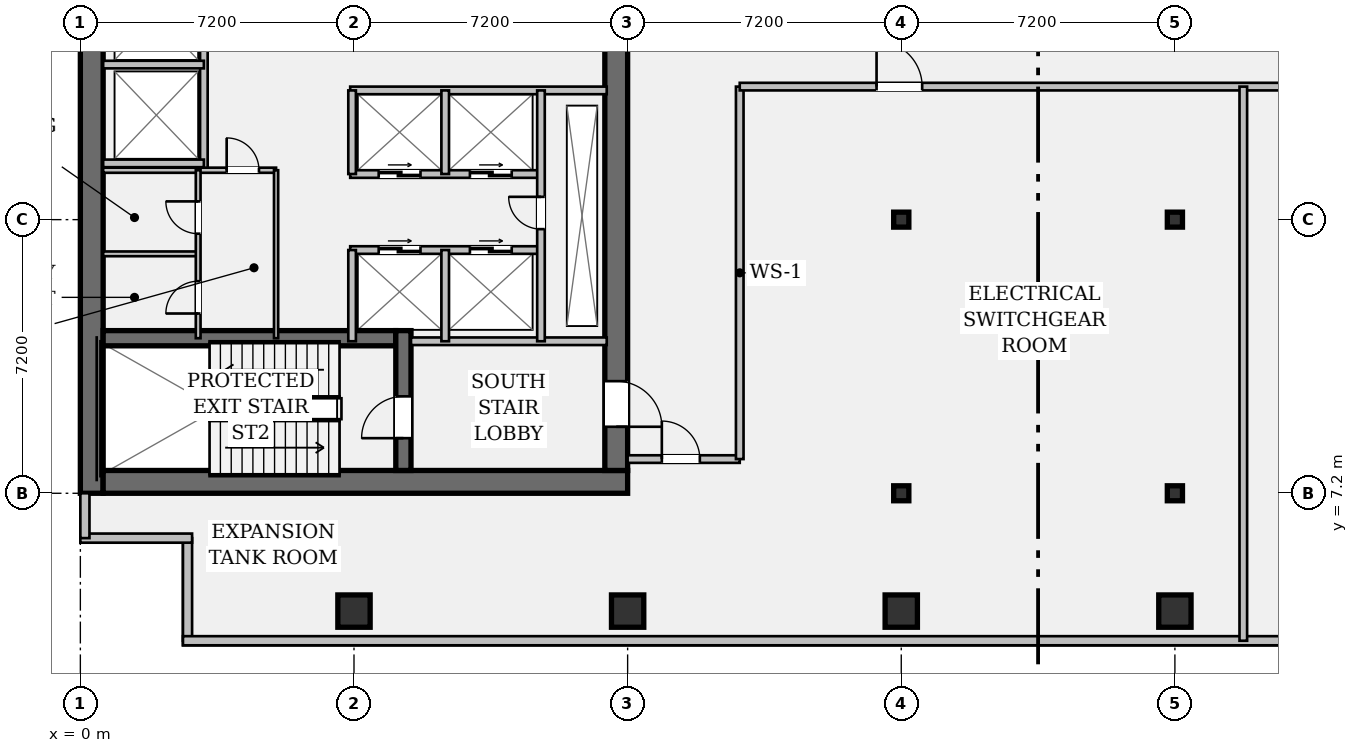
"""IFC4 building model, lengths in metres.
Left out: names, types, materials, properties, quantities, classifications, styles, units other than length and angle.
Written with IfcOpenShell. Run it as: python <this file> out.ifc"""

import sys

from ifc_helpers import new_model, si_unit, direction, frame, frame_2d, origin, origin_2d, place, context, subcontext, project, spatial, rectangle, hollow_rectangle, i_section, extrude, element, fill, save


model = new_model("IFC4")
c1 = context("Model", 3, precision=1e-05, world=origin(), true_north=direction((0.0, 1.0)))
c2 = subcontext(c1, "Body", "Model", "MODEL_VIEW")
j1 = project(units=[si_unit("LENGTHUNIT", "METRE"), si_unit("PLANEANGLEUNIT", "RADIAN")], contexts=[c1])
p1 = place(None, origin())
s1 = spatial("IfcSite", under=j1, at=p1, CompositionType="ELEMENT")
p2 = place(p1, origin())
s2 = spatial("IfcBuilding", under=s1, at=p2, CompositionType="ELEMENT")
p3 = place(p2, frame((0.0, 0.0, 163.8)))
s3 = spatial("IfcBuildingStorey", under=s2, at=p3, CompositionType="ELEMENT", Elevation=163.8)
p4 = place(p3, frame((0.3, 7.2, 0.0), z_axis=(0.0, 0.0, 1.0), x_axis=(0.0, 1.0, 0.0)))
e1 = element("IfcWall", 1, at=p4, inside=s3, PredefinedType="SHEAR", context=c2, shape_type="SweptSolid", body=[
    extrude(rectangle(XDim=28.8, YDim=0.6, at=frame_2d((14.4, 0.0))), origin(), (0.0, 0.0, 1.0), 4.6),
])
p5 = place(p3, frame((0.6, 7.5, 0.0), z_axis=(0.0, 0.0, 1.0), x_axis=(1.0, 0.0, 0.0)))
e2 = element("IfcWall", 2, at=p5, inside=s3, PredefinedType="SHEAR", context=c2, shape_type="SweptSolid", body=[
    extrude(rectangle(XDim=13.8, YDim=0.6, at=frame_2d((6.9, 0.0))), origin(), (0.0, 0.0, 1.0), 4.6),
])
p6 = place(p3, frame((14.1, 35.4, 0.0), z_axis=(0.0, 0.0, 1.0), x_axis=(0.0, -1.0, 0.0)))
e3 = element("IfcWall", 3, at=p6, inside=s3, PredefinedType="SHEAR", context=c2, shape_type="SweptSolid", body=[
    extrude(rectangle(XDim=27.6, YDim=0.6, at=frame_2d((13.8, 0.0))), origin(), (0.0, 0.0, 1.0), 4.6),
])
p7 = place(p6, frame((1.3, 0.0, 0.0)))
e4 = element("IfcOpeningElement", 4, at=p7, cuts=e3, PredefinedType="OPENING", context=c2, shape_type="SweptSolid", body=[
    extrude(rectangle(XDim=1.2, YDim=2.15, at=frame_2d((0.6, 1.075))), frame((0.0, 0.312, 0.0), z_axis=(0.0, -1.0, 0.0), x_axis=(1.0, 0.0, 0.0)), (0.0, 0.0, 1.0), 0.624),
])
p8 = place(p6, frame((25.25, 0.0, 0.0)))
e5 = element("IfcOpeningElement", 5, at=p8, cuts=e3, PredefinedType="OPENING", context=c2, shape_type="SweptSolid", body=[
    extrude(rectangle(XDim=1.2, YDim=2.15, at=frame_2d((0.6, 1.075))), frame((0.0, 0.312, 0.0), z_axis=(0.0, -1.0, 0.0), x_axis=(1.0, 0.0, 0.0)), (0.0, 0.0, 1.0), 0.624),
])
p9 = place(p6, frame((14.6, 0.0, 0.0)))
e6 = element("IfcOpeningElement", 6, at=p9, cuts=e3, PredefinedType="OPENING", context=c2, shape_type="SweptSolid", body=[
    extrude(rectangle(XDim=1.6, YDim=2.2, at=frame_2d((0.8, 1.1))), frame((0.0, 0.312, 0.0), z_axis=(0.0, -1.0, 0.0), x_axis=(1.0, 0.0, 0.0)), (0.0, 0.0, 1.0), 0.624),
])
p10 = place(p3, frame((0.6, 11.28, 0.0), z_axis=(0.0, 0.0, 1.0), x_axis=(1.0, 0.0, 0.0)))
e7 = element("IfcWall", 7, at=p10, inside=s3, PredefinedType="SHEAR", context=c2, shape_type="SweptSolid", body=[
    extrude(rectangle(XDim=7.7, YDim=0.4, at=frame_2d((3.85, 0.0))), origin(), (0.0, 0.0, 1.0), 4.6),
])
p11 = place(p3, frame((8.5, 7.8, 0.0), z_axis=(0.0, 0.0, 1.0), x_axis=(0.0, 1.0, 0.0)))
e8 = element("IfcWall", 8, at=p11, inside=s3, PredefinedType="SHEAR", context=c2, shape_type="SweptSolid", body=[
    extrude(rectangle(XDim=3.68, YDim=0.4, at=frame_2d((1.84, 0.0))), origin(), (0.0, 0.0, 1.0), 4.6),
])
p12 = place(p11, frame((0.85, 0.0, 0.0)))
e9 = element("IfcOpeningElement", 9, at=p12, cuts=e8, PredefinedType="OPENING", context=c2, shape_type="SweptSolid", body=[
    extrude(rectangle(XDim=1.1, YDim=2.15, at=frame_2d((0.55, 1.075))), frame((0.0, 0.212, 0.0), z_axis=(0.0, -1.0, 0.0), x_axis=(1.0, 0.0, 0.0)), (0.0, 0.0, 1.0), 0.424),
])
for number, where, z_axis, x_axis in (
    (10, (7.2, 4.1, 0.0), (0.0, 0.0, 1.0), (1.0, 0.0, 0.0)),
    (11, (14.4, 4.1, 0.0), (0.0, 0.0, 1.0), (1.0, 0.0, 0.0)),
    (12, (21.6, 4.1, 0.0), (0.0, 0.0, 1.0), (1.0, 0.0, 0.0)),
):
    element("IfcColumn", number, at=place(p3, frame(where, z_axis=z_axis, x_axis=x_axis)), inside=s3, PredefinedType="COLUMN", context=c2, shape_type="SweptSolid", body=[
        extrude(hollow_rectangle(XDim=0.85, YDim=0.85, WallThickness=0.05, at=origin_2d()), origin(), (0.0, 0.0, 1.0), 4.6),
    ])
for number, where, z_axis, x_axis in (
    (13, (21.6, 7.2, 0.0), (0.0, 0.0, 1.0), (1.0, 0.0, 0.0)),
    (14, (21.6, 14.4, 0.0), (0.0, 0.0, 1.0), (1.0, 0.0, 0.0)),
):
    element("IfcColumn", number, at=place(p3, frame(where, z_axis=z_axis, x_axis=x_axis)), inside=s3, PredefinedType="COLUMN", context=c2, shape_type="SweptSolid", body=[
        extrude(i_section(OverallWidth=0.399, OverallDepth=0.394, WebThickness=0.023, FlangeThickness=0.037, FilletRadius=0.018, at=origin_2d()), origin(), (0.0, 0.0, 1.0), 4.6),
    ])
p13 = place(p3, frame((28.8, 4.1, 0.0), z_axis=(0.0, 0.0, 1.0), x_axis=(1.0, 0.0, 0.0)))
e15 = element("IfcColumn", 15, at=p13, inside=s3, PredefinedType="COLUMN", context=c2, shape_type="SweptSolid", body=[
    extrude(hollow_rectangle(XDim=0.85, YDim=0.85, WallThickness=0.05, at=origin_2d()), origin(), (0.0, 0.0, 1.0), 4.6),
])
for number, where, z_axis, x_axis in (
    (16, (28.8, 7.2, 0.0), (0.0, 0.0, 1.0), (1.0, 0.0, 0.0)),
    (17, (28.8, 14.4, 0.0), (0.0, 0.0, 1.0), (1.0, 0.0, 0.0)),
):
    element("IfcColumn", number, at=place(p3, frame(where, z_axis=z_axis, x_axis=x_axis)), inside=s3, PredefinedType="COLUMN", context=c2, shape_type="SweptSolid", body=[
        extrude(i_section(OverallWidth=0.399, OverallDepth=0.394, WebThickness=0.023, FlangeThickness=0.037, FilletRadius=0.018, at=origin_2d()), origin(), (0.0, 0.0, 1.0), 4.6),
    ])
p14 = place(p3, frame((2.82, 3.32, 0.0), z_axis=(0.0, 0.0, 1.0), x_axis=(0.0, 1.0, 0.0)))
e18 = element("IfcWall", 18, at=p14, inside=s3, PredefinedType="STANDARD", context=c2, shape_type="SweptSolid", body=[
    extrude(rectangle(XDim=2.7, YDim=0.24, at=frame_2d((1.35, 0.0))), origin(), (0.0, 0.0, 1.0), 4.6),
])
p15 = place(p3, frame((2.94, 6.02, 0.0), z_axis=(0.0, 0.0, 1.0), x_axis=(-1.0, 0.0, 0.0)))
e19 = element("IfcWall", 19, at=p15, inside=s3, PredefinedType="STANDARD", context=c2, shape_type="SweptSolid", body=[
    extrude(rectangle(XDim=2.94, YDim=0.24, at=frame_2d((1.47, 0.0))), origin(), (0.0, 0.0, 1.0), 4.6),
])
p16 = place(p3, frame((0.12, 6.02, 0.0), z_axis=(0.0, 0.0, 1.0), x_axis=(0.0, 1.0, 0.0)))
e20 = element("IfcWall", 20, at=p16, inside=s3, PredefinedType="STANDARD", context=c2, shape_type="SweptSolid", body=[
    extrude(rectangle(XDim=1.18, YDim=0.24, at=frame_2d((0.59, 0.0))), origin(), (0.0, 0.0, 1.0), 4.6),
])
p17 = place(p3, frame((41.3, 3.32, 0.0), z_axis=(0.0, 0.0, 1.0), x_axis=(-1.0, 0.0, 0.0)))
e21 = element("IfcWall", 21, at=p17, inside=s3, PredefinedType="STANDARD", context=c2, shape_type="SweptSolid", body=[
    extrude(rectangle(XDim=38.6, YDim=0.24, at=frame_2d((19.3, 0.0))), origin(), (0.0, 0.0, 1.0), 4.6),
])
p18 = place(p3, frame((8.7, 11.2, 0.0), z_axis=(0.0, 0.0, 1.0), x_axis=(1.0, 0.0, 0.0)))
e22 = element("IfcWall", 22, at=p18, inside=s3, PredefinedType="PARTITIONING", context=c2, shape_type="SweptSolid", body=[
    extrude(rectangle(XDim=5.15, YDim=0.2, at=frame_2d((2.575, 0.0))), origin(), (0.0, 0.0, 1.0), 4.6),
])
p19 = place(p3, frame((3.25, 15.7, 0.0), z_axis=(0.0, 0.0, 1.0), x_axis=(0.0, 1.0, 0.0)))
e23 = element("IfcWall", 23, at=p19, inside=s3, PredefinedType="PARTITIONING", context=c2, shape_type="SweptSolid", body=[
    extrude(rectangle(XDim=13.08, YDim=0.2, at=frame_2d((6.54, 0.0))), origin(), (0.0, 0.0, 1.0), 4.6),
])
for number, where, z_axis, x_axis in (
    (24, (0.6, 15.88, 0.0), (0.0, 0.0, 1.0), (1.0, 0.0, 0.0)),
    (25, (0.6, 18.48, 0.0), (0.0, 0.0, 1.0), (1.0, 0.0, 0.0)),
):
    element("IfcWall", number, at=place(p3, frame(where, z_axis=z_axis, x_axis=x_axis)), inside=s3, PredefinedType="PARTITIONING", context=c2, shape_type="SweptSolid", body=[
        extrude(rectangle(XDim=2.65, YDim=0.2, at=frame_2d((1.325, 0.0))), origin(), (0.0, 0.0, 1.0), 4.6),
    ])
p20 = place(p3, frame((7.1, 17.8, 0.0), z_axis=(0.0, 0.0, 1.0), x_axis=(1.0, 0.0, 0.0)))
e26 = element("IfcWall", 26, at=p20, inside=s3, PredefinedType="PARTITIONING", context=c2, shape_type="SweptSolid", body=[
    extrude(rectangle(XDim=6.75, YDim=0.2, at=frame_2d((3.375, 0.0))), origin(), (0.0, 0.0, 1.0), 4.6),
])
p21 = place(p3, frame((7.1, 15.6, 0.0), z_axis=(0.0, 0.0, 1.0), x_axis=(1.0, 0.0, 0.0)))
e27 = element("IfcWall", 27, at=p21, inside=s3, PredefinedType="PARTITIONING", context=c2, shape_type="SweptSolid", body=[
    extrude(rectangle(XDim=5.02, YDim=0.2, at=frame_2d((2.51, 0.0))), origin(), (0.0, 0.0, 1.0), 4.6),
])
p22 = place(p21, frame((0.75, 0.0, 0.0)))
e28 = element("IfcOpeningElement", 28, at=p22, cuts=e27, PredefinedType="OPENING", context=c2, shape_type="SweptSolid", body=[
    extrude(rectangle(XDim=1.1, YDim=2.2, at=frame_2d((0.55, 1.1))), frame((0.0, 0.112, 0.0), z_axis=(0.0, -1.0, 0.0), x_axis=(1.0, 0.0, 0.0)), (0.0, 0.0, 1.0), 0.224),
])
p23 = place(p21, frame((3.15, 0.0, 0.0)))
e29 = element("IfcOpeningElement", 29, at=p23, cuts=e27, PredefinedType="OPENING", context=c2, shape_type="SweptSolid", body=[
    extrude(rectangle(XDim=1.1, YDim=2.2, at=frame_2d((0.55, 1.1))), frame((0.0, 0.112, 0.0), z_axis=(0.0, -1.0, 0.0), x_axis=(1.0, 0.0, 0.0)), (0.0, 0.0, 1.0), 0.224),
])
p24 = place(p3, frame((7.1, 13.6, 0.0), z_axis=(0.0, 0.0, 1.0), x_axis=(1.0, 0.0, 0.0)))
e30 = element("IfcWall", 30, at=p24, inside=s3, PredefinedType="PARTITIONING", context=c2, shape_type="SweptSolid", body=[
    extrude(rectangle(XDim=5.02, YDim=0.2, at=frame_2d((2.51, 0.0))), origin(), (0.0, 0.0, 1.0), 4.6),
])
p25 = place(p24, frame((0.75, 0.0, 0.0)))
e31 = element("IfcOpeningElement", 31, at=p25, cuts=e30, PredefinedType="OPENING", context=c2, shape_type="SweptSolid", body=[
    extrude(rectangle(XDim=1.1, YDim=2.2, at=frame_2d((0.55, 1.1))), frame((0.0, 0.112, 0.0), z_axis=(0.0, -1.0, 0.0), x_axis=(1.0, 0.0, 0.0)), (0.0, 0.0, 1.0), 0.224),
])
p26 = place(p24, frame((3.15, 0.0, 0.0)))
e32 = element("IfcOpeningElement", 32, at=p26, cuts=e30, PredefinedType="OPENING", context=c2, shape_type="SweptSolid", body=[
    extrude(rectangle(XDim=1.1, YDim=2.2, at=frame_2d((0.55, 1.1))), frame((0.0, 0.112, 0.0), z_axis=(0.0, -1.0, 0.0), x_axis=(1.0, 0.0, 0.0)), (0.0, 0.0, 1.0), 0.224),
])
p27 = place(p3, frame((7.15, 15.6, 0.0), z_axis=(0.0, 0.0, 1.0), x_axis=(0.0, 1.0, 0.0)))
e33 = element("IfcWall", 33, at=p27, inside=s3, PredefinedType="PARTITIONING", context=c2, shape_type="SweptSolid", body=[
    extrude(rectangle(XDim=2.2, YDim=0.2, at=frame_2d((1.1, 0.0))), origin(), (0.0, 0.0, 1.0), 4.6),
])
p28 = place(p3, frame((7.15, 11.2, 0.0), z_axis=(0.0, 0.0, 1.0), x_axis=(0.0, 1.0, 0.0)))
e34 = element("IfcWall", 34, at=p28, inside=s3, PredefinedType="PARTITIONING", context=c2, shape_type="SweptSolid", body=[
    extrude(rectangle(XDim=2.4, YDim=0.2, at=frame_2d((1.2, 0.0))), origin(), (0.0, 0.0, 1.0), 4.6),
])
p29 = place(p3, frame((9.6, 15.6, 0.0), z_axis=(0.0, 0.0, 1.0), x_axis=(0.0, 1.0, 0.0)))
e35 = element("IfcWall", 35, at=p29, inside=s3, PredefinedType="PARTITIONING", context=c2, shape_type="SweptSolid", body=[
    extrude(rectangle(XDim=2.2, YDim=0.2, at=frame_2d((1.1, 0.0))), origin(), (0.0, 0.0, 1.0), 4.6),
])
p30 = place(p3, frame((9.6, 11.2, 0.0), z_axis=(0.0, 0.0, 1.0), x_axis=(0.0, 1.0, 0.0)))
e36 = element("IfcWall", 36, at=p30, inside=s3, PredefinedType="PARTITIONING", context=c2, shape_type="SweptSolid", body=[
    extrude(rectangle(XDim=2.4, YDim=0.2, at=frame_2d((1.2, 0.0))), origin(), (0.0, 0.0, 1.0), 4.6),
])
p31 = place(p3, frame((12.12, 11.2, 0.0), z_axis=(0.0, 0.0, 1.0), x_axis=(0.0, 1.0, 0.0)))
e37 = element("IfcWall", 37, at=p31, inside=s3, PredefinedType="PARTITIONING", context=c2, shape_type="SweptSolid", body=[
    extrude(rectangle(XDim=6.6, YDim=0.2, at=frame_2d((3.3, 0.0))), origin(), (0.0, 0.0, 1.0), 4.6),
])
p32 = place(p31, frame((2.95, 0.0, 0.0)))
e38 = element("IfcOpeningElement", 38, at=p32, cuts=e37, PredefinedType="OPENING", context=c2, shape_type="SweptSolid", body=[
    extrude(rectangle(XDim=0.85, YDim=2.15, at=frame_2d((0.425, 1.075))), frame((0.0, 0.112, 0.0), z_axis=(0.0, -1.0, 0.0), x_axis=(1.0, 0.0, 0.0)), (0.0, 0.0, 1.0), 0.224),
])
p33 = place(p3, frame((0.6, 15.7, 0.0), z_axis=(0.0, 0.0, 1.0), x_axis=(1.0, 0.0, 0.0)))
e39 = element("IfcWall", 39, at=p33, inside=s3, PredefinedType="PARTITIONING", context=c2, shape_type="SweptSolid", body=[
    extrude(rectangle(XDim=4.55, YDim=0.135, at=frame_2d((2.275, 0.0))), origin(), (0.0, 0.0, 1.0), 4.6),
])
p34 = place(p33, frame((3.25, 0.0, 0.0)))
e40 = element("IfcOpeningElement", 40, at=p34, cuts=e39, PredefinedType="OPENING", context=c2, shape_type="SweptSolid", body=[
    extrude(rectangle(XDim=0.85, YDim=2.15, at=frame_2d((0.425, 1.075))), frame((0.0, 0.08, 0.0), z_axis=(0.0, -1.0, 0.0), x_axis=(1.0, 0.0, 0.0)), (0.0, 0.0, 1.0), 0.159),
])
p35 = place(p3, frame((5.15, 11.28, 0.0), z_axis=(0.0, 0.0, 1.0), x_axis=(0.0, 1.0, 0.0)))
e41 = element("IfcWall", 41, at=p35, inside=s3, PredefinedType="PARTITIONING", context=c2, shape_type="SweptSolid", body=[
    extrude(rectangle(XDim=4.42, YDim=0.11, at=frame_2d((2.21, 0.0))), origin(), (0.0, 0.0, 1.0), 4.6),
])
p36 = place(p3, frame((0.6, 13.5, 0.0), z_axis=(0.0, 0.0, 1.0), x_axis=(1.0, 0.0, 0.0)))
e42 = element("IfcWall", 42, at=p36, inside=s3, PredefinedType="PARTITIONING", context=c2, shape_type="SweptSolid", body=[
    extrude(rectangle(XDim=2.5, YDim=0.125, at=frame_2d((1.25, 0.0))), origin(), (0.0, 0.0, 1.0), 4.6),
])
p37 = place(p3, frame((3.1, 11.28, 0.0), z_axis=(0.0, 0.0, 1.0), x_axis=(0.0, 1.0, 0.0)))
e43 = element("IfcWall", 43, at=p37, inside=s3, PredefinedType="PARTITIONING", context=c2, shape_type="SweptSolid", body=[
    extrude(rectangle(XDim=4.42, YDim=0.125, at=frame_2d((2.21, 0.0))), origin(), (0.0, 0.0, 1.0), 4.6),
])
p38 = place(p37, frame((0.65, 0.0, 0.0)))
e44 = element("IfcOpeningElement", 44, at=p38, cuts=e43, PredefinedType="OPENING", context=c2, shape_type="SweptSolid", body=[
    extrude(rectangle(XDim=0.85, YDim=2.15, at=frame_2d((0.425, 1.075))), frame((0.0, 0.074, 0.0), z_axis=(0.0, -1.0, 0.0), x_axis=(1.0, 0.0, 0.0)), (0.0, 0.0, 1.0), 0.149),
])
p39 = place(p37, frame((2.75, 0.0, 0.0)))
e45 = element("IfcOpeningElement", 45, at=p39, cuts=e43, PredefinedType="OPENING", context=c2, shape_type="SweptSolid", body=[
    extrude(rectangle(XDim=0.85, YDim=2.15, at=frame_2d((0.425, 1.075))), frame((0.0, 0.074, 0.0), z_axis=(0.0, -1.0, 0.0), x_axis=(1.0, 0.0, 0.0)), (0.0, 0.0, 1.0), 0.149),
])
p40 = place(p3, frame((14.4, 8.1, 0.0), z_axis=(0.0, 0.0, 1.0), x_axis=(1.0, 0.0, 0.0)))
e46 = element("IfcWall", 46, at=p40, inside=s3, PredefinedType="PARTITIONING", context=c2, shape_type="SweptSolid", body=[
    extrude(rectangle(XDim=2.95, YDim=0.2, at=frame_2d((1.475, 0.0))), origin(), (0.0, 0.0, 1.0), 4.168),
])
p41 = place(p40, frame((0.9, 0.0, 0.0)))
e47 = element("IfcOpeningElement", 47, at=p41, cuts=e46, PredefinedType="OPENING", context=c2, shape_type="SweptSolid", body=[
    extrude(rectangle(XDim=1.0, YDim=2.15, at=frame_2d((0.5, 1.075))), frame((0.0, 0.112, 0.0), z_axis=(0.0, -1.0, 0.0), x_axis=(1.0, 0.0, 0.0)), (0.0, 0.0, 1.0), 0.224),
])
p42 = place(p3, frame((17.35, 8.1, 0.0), z_axis=(0.0, 0.0, 1.0), x_axis=(0.0, 1.0, 0.0)))
e48 = element("IfcWall", 48, at=p42, inside=s3, PredefinedType="PARTITIONING", context=c2, shape_type="SweptSolid", body=[
    extrude(rectangle(XDim=9.8, YDim=0.2, at=frame_2d((4.9, 0.0))), origin(), (0.0, 0.0, 1.0), 3.963),
])
p43 = place(p3, frame((17.35, 17.9, 0.0), z_axis=(0.0, 0.0, 1.0), x_axis=(1.0, 0.0, 0.0)))
e49 = element("IfcWall", 49, at=p43, inside=s3, PredefinedType="PARTITIONING", context=c2, shape_type="SweptSolid", body=[
    extrude(rectangle(XDim=26.49, YDim=0.2, at=frame_2d((13.245, 0.0))), origin(), (0.0, 0.0, 1.0), 3.963),
])
p44 = place(p43, frame((3.6, 0.0, 0.0)))
e50 = element("IfcOpeningElement", 50, at=p44, cuts=e49, PredefinedType="OPENING", context=c2, shape_type="SweptSolid", body=[
    extrude(rectangle(XDim=1.2, YDim=2.15, at=frame_2d((0.6, 1.075))), frame((0.0, 0.112, 0.0), z_axis=(0.0, -1.0, 0.0), x_axis=(1.0, 0.0, 0.0)), (0.0, 0.0, 1.0), 0.224),
])
p45 = place(p43, frame((16.05, 0.0, 0.0)))
e51 = element("IfcOpeningElement", 51, at=p45, cuts=e49, PredefinedType="OPENING", context=c2, shape_type="SweptSolid", body=[
    extrude(rectangle(XDim=1.2, YDim=2.15, at=frame_2d((0.6, 1.075))), frame((0.0, 0.112, 0.0), z_axis=(0.0, -1.0, 0.0), x_axis=(1.0, 0.0, 0.0)), (0.0, 0.0, 1.0), 0.224),
])
p46 = place(p3, frame((30.6, 3.32, 0.0), z_axis=(0.0, 0.0, 1.0), x_axis=(0.0, 1.0, 0.0)))
e52 = element("IfcWall", 52, at=p46, inside=s3, PredefinedType="PARTITIONING", context=c2, shape_type="SweptSolid", body=[
    extrude(rectangle(XDim=14.58, YDim=0.2, at=frame_2d((7.29, 0.0))), origin(), (0.0, 0.0, 1.0), 3.963),
])
p47 = place(p12, origin())
e53 = element("IfcDoor", 53, at=p47, inside=s3, OperationType="SINGLE_SWING_LEFT", PredefinedType="DOOR", context=c2, shape_type="SweptSolid", body=[
    extrude(rectangle(XDim=1.1, YDim=2.15, at=frame_2d((0.55, 1.075))), frame((0.0, 0.025, 0.0), z_axis=(0.0, -1.0, 0.0), x_axis=(1.0, 0.0, 0.0)), (0.0, 0.0, 1.0), 0.05),
])
fill(e9, e53)
p48 = place(p8, origin())
e54 = element("IfcDoor", 54, at=p48, inside=s3, OperationType="SINGLE_SWING_RIGHT", PredefinedType="DOOR", context=c2, shape_type="SweptSolid", body=[
    extrude(rectangle(XDim=1.2, YDim=2.15, at=frame_2d((0.6, 1.075))), frame((0.0, 0.025, 0.0), z_axis=(0.0, -1.0, 0.0), x_axis=(1.0, 0.0, 0.0)), (0.0, 0.0, 1.0), 0.05),
])
fill(e5, e54)
p49 = place(p32, origin())
e55 = element("IfcDoor", 55, at=p49, inside=s3, OperationType="SINGLE_SWING_RIGHT", PredefinedType="DOOR", context=c2, shape_type="SweptSolid", body=[
    extrude(rectangle(XDim=0.85, YDim=2.15, at=frame_2d((0.425, 1.075))), frame((0.0, 0.025, 0.0), z_axis=(0.0, -1.0, 0.0), x_axis=(1.0, 0.0, 0.0)), (0.0, 0.0, 1.0), 0.05),
])
fill(e38, e55)
p50 = place(p22, origin())
e56 = element("IfcDoor", 56, at=p50, inside=s3, OperationType="DOUBLE_DOOR_SLIDING", PredefinedType="DOOR", context=c2, shape_type="SweptSolid", body=[
    extrude(rectangle(XDim=1.1, YDim=2.2, at=frame_2d((0.55, 1.1))), frame((0.0, 0.025, 0.0), z_axis=(0.0, -1.0, 0.0), x_axis=(1.0, 0.0, 0.0)), (0.0, 0.0, 1.0), 0.05),
])
fill(e28, e56)
p51 = place(p23, origin())
e57 = element("IfcDoor", 57, at=p51, inside=s3, OperationType="DOUBLE_DOOR_SLIDING", PredefinedType="DOOR", context=c2, shape_type="SweptSolid", body=[
    extrude(rectangle(XDim=1.1, YDim=2.2, at=frame_2d((0.55, 1.1))), frame((0.0, 0.025, 0.0), z_axis=(0.0, -1.0, 0.0), x_axis=(1.0, 0.0, 0.0)), (0.0, 0.0, 1.0), 0.05),
])
fill(e29, e57)
p52 = place(p25, origin())
e58 = element("IfcDoor", 58, at=p52, inside=s3, OperationType="DOUBLE_DOOR_SLIDING", PredefinedType="DOOR", context=c2, shape_type="SweptSolid", body=[
    extrude(rectangle(XDim=1.1, YDim=2.2, at=frame_2d((0.55, 1.1))), frame((0.0, 0.025, 0.0), z_axis=(0.0, -1.0, 0.0), x_axis=(1.0, 0.0, 0.0)), (0.0, 0.0, 1.0), 0.05),
])
fill(e31, e58)
p53 = place(p26, origin())
e59 = element("IfcDoor", 59, at=p53, inside=s3, OperationType="DOUBLE_DOOR_SLIDING", PredefinedType="DOOR", context=c2, shape_type="SweptSolid", body=[
    extrude(rectangle(XDim=1.1, YDim=2.2, at=frame_2d((0.55, 1.1))), frame((0.0, 0.025, 0.0), z_axis=(0.0, -1.0, 0.0), x_axis=(1.0, 0.0, 0.0)), (0.0, 0.0, 1.0), 0.05),
])
fill(e32, e59)
p54 = place(p34, origin())
e60 = element("IfcDoor", 60, at=p54, inside=s3, OperationType="SINGLE_SWING_LEFT", PredefinedType="DOOR", context=c2, shape_type="SweptSolid", body=[
    extrude(rectangle(XDim=0.85, YDim=2.15, at=frame_2d((0.425, 1.075))), frame((0.0, 0.025, 0.0), z_axis=(0.0, -1.0, 0.0), x_axis=(1.0, 0.0, 0.0)), (0.0, 0.0, 1.0), 0.05),
])
fill(e40, e60)
p55 = place(p38, origin())
e61 = element("IfcDoor", 61, at=p55, inside=s3, OperationType="SINGLE_SWING_LEFT", PredefinedType="DOOR", context=c2, shape_type="SweptSolid", body=[
    extrude(rectangle(XDim=0.85, YDim=2.15, at=frame_2d((0.425, 1.075))), frame((0.0, 0.025, 0.0), z_axis=(0.0, -1.0, 0.0), x_axis=(1.0, 0.0, 0.0)), (0.0, 0.0, 1.0), 0.05),
])
fill(e44, e61)
p56 = place(p39, origin())
e62 = element("IfcDoor", 62, at=p56, inside=s3, OperationType="SINGLE_SWING_RIGHT", PredefinedType="DOOR", context=c2, shape_type="SweptSolid", body=[
    extrude(rectangle(XDim=0.85, YDim=2.15, at=frame_2d((0.425, 1.075))), frame((0.0, 0.025, 0.0), z_axis=(0.0, -1.0, 0.0), x_axis=(1.0, 0.0, 0.0)), (0.0, 0.0, 1.0), 0.05),
])
fill(e45, e62)
p57 = place(p44, origin())
e63 = element("IfcDoor", 63, at=p57, inside=s3, OperationType="SINGLE_SWING_LEFT", PredefinedType="DOOR", context=c2, shape_type="SweptSolid", body=[
    extrude(rectangle(XDim=1.2, YDim=2.15, at=frame_2d((0.6, 1.075))), frame((0.0, 0.025, 0.0), z_axis=(0.0, -1.0, 0.0), x_axis=(1.0, 0.0, 0.0)), (0.0, 0.0, 1.0), 0.05),
])
fill(e50, e63)
p58 = place(p41, origin())
e64 = element("IfcDoor", 64, at=p58, inside=s3, OperationType="SINGLE_SWING_LEFT", PredefinedType="DOOR", context=c2, shape_type="SweptSolid", body=[
    extrude(rectangle(XDim=1.0, YDim=2.15, at=frame_2d((0.5, 1.075))), frame((0.0, 0.025, 0.0), z_axis=(0.0, -1.0, 0.0), x_axis=(1.0, 0.0, 0.0)), (0.0, 0.0, 1.0), 0.05),
])
fill(e47, e64)
save(model, sys.argv[1])
